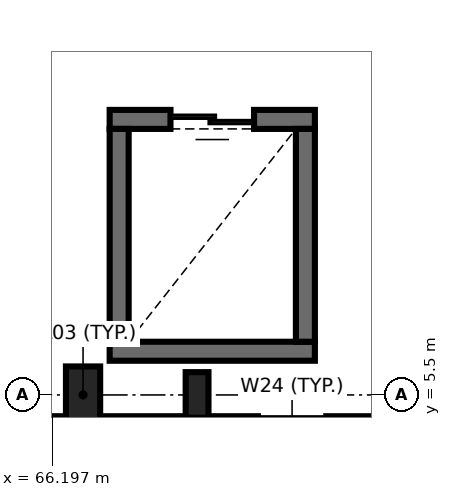
"""IFC4 building model, lengths in metres.
Left out: names, types, materials, properties, quantities, classifications, styles, units other than length and angle.
Written with IfcOpenShell. Run it as: python <this file> out.ifc"""

import sys

from ifc_helpers import new_model, si_unit, direction, frame, frame_2d, origin, origin_2d, place, context, subcontext, project, spatial, rectangle, i_section, extrude, element, fill, save


model = new_model("IFC4")
c1 = context("Model", 3, precision=1e-05, world=origin(), true_north=direction((0.0, 1.0)))
c2 = subcontext(c1, "Body", "Model", "MODEL_VIEW")
j1 = project(units=[si_unit("LENGTHUNIT", "METRE"), si_unit("PLANEANGLEUNIT", "RADIAN")], contexts=[c1])
p1 = place(None, origin())
s1 = spatial("IfcSite", under=j1, at=p1, CompositionType="ELEMENT")
p2 = place(p1, origin())
s2 = spatial("IfcBuilding", under=s1, at=p2, CompositionType="ELEMENT")
p3 = place(p2, origin())
s3 = spatial("IfcBuildingStorey", under=s2, at=p3, CompositionType="ELEMENT", Elevation=0.0)
p4 = place(p3, frame((66.6, 5.5, 0.0), z_axis=(0.0, 0.0, 1.0), x_axis=(1.0, 0.0, 0.0)))
e1 = element("IfcColumn", 1, at=p4, inside=s3, PredefinedType="PILASTER", context=c2, shape_type="SweptSolid", body=[
    extrude(rectangle(XDim=0.45, YDim=0.75, at=origin_2d()), origin(), (0.0, 0.0, 1.0), 4.8),
])
p5 = place(p3, frame((68.1, 5.5, 0.0), z_axis=(0.0, 0.0, 1.0), x_axis=(1.0, 0.0, 0.0)))
e2 = element("IfcColumn", 2, at=p5, inside=s3, PredefinedType="COLUMN", context=c2, shape_type="SweptSolid", body=[
    extrude(i_section(OverallWidth=0.3, OverallDepth=0.6, WebThickness=0.015, FlangeThickness=0.03, FilletRadius=0.027, at=origin_2d()), origin(), (0.0, 0.0, 1.0), 4.8),
])
p6 = place(p3, frame((66.95, 6.075, 0.0), z_axis=(0.0, 0.0, 1.0), x_axis=(1.0, 0.0, 0.0)))
e3 = element("IfcWall", 3, at=p6, inside=s3, PredefinedType="SHEAR", context=c2, shape_type="SweptSolid", body=[
    extrude(rectangle(XDim=2.7, YDim=0.25, at=frame_2d((1.35, 0.0))), origin(), (0.0, 0.0, 1.0), 4.8),
])
p7 = place(p3, frame((69.65, 9.125, 0.0), z_axis=(0.0, 0.0, 1.0), x_axis=(-1.0, 0.0, 0.0)))
e4 = element("IfcWall", 4, at=p7, inside=s3, PredefinedType="SHEAR", context=c2, shape_type="SweptSolid", body=[
    extrude(rectangle(XDim=2.7, YDim=0.25, at=frame_2d((1.35, 0.0))), origin(), (0.0, 0.0, 1.0), 4.8),
])
p8 = place(p7, frame((0.8, 0.0, 0.0)))
e5 = element("IfcOpeningElement", 5, at=p8, cuts=e4, PredefinedType="OPENING", context=c2, shape_type="SweptSolid", body=[
    extrude(rectangle(XDim=1.1, YDim=2.15, at=frame_2d((0.55, 1.075))), frame((0.0, 0.135, 0.0), z_axis=(0.0, -1.0, 0.0), x_axis=(1.0, 0.0, 0.0)), (0.0, 0.0, 1.0), 0.27),
])
for number, where, z_axis, x_axis in (
    (6, (67.075, 9.0, 0.0), (0.0, 0.0, 1.0), (0.0, -1.0, 0.0)),
    (7, (69.525, 6.2, 0.0), (0.0, 0.0, 1.0), (0.0, 1.0, 0.0)),
):
    element("IfcWall", number, at=place(p3, frame(where, z_axis=z_axis, x_axis=x_axis)), inside=s3, PredefinedType="SHEAR", context=c2, shape_type="SweptSolid", body=[
        extrude(rectangle(XDim=2.8, YDim=0.25, at=frame_2d((1.4, 0.0))), origin(), (0.0, 0.0, 1.0), 4.8),
    ])
p9 = place(p3, frame((55.002, 5.06, 0.0), z_axis=(0.0, 0.0, 1.0), x_axis=(1.0, 0.0, 0.0)))
e8 = element("IfcWall", 8, at=p9, inside=s3, PredefinedType="SHEAR", context=c2, shape_type="SweptSolid", body=[
    extrude(rectangle(XDim=49.196, YDim=0.32, at=frame_2d((24.598, 0.0))), origin(), (0.0, 0.0, 1.0), 4.55),
])
p10 = place(p9, frame((19.998, 0.0, 0.0)))
e9 = element("IfcOpeningElement", 9, at=p10, cuts=e8, PredefinedType="OPENING", context=c2, shape_type="SweptSolid", body=[
    extrude(rectangle(XDim=2.0, YDim=2.4, at=frame_2d((1.0, 1.2))), frame((0.0, 0.17, 0.0), z_axis=(0.0, -1.0, 0.0), x_axis=(1.0, 0.0, 0.0)), (0.0, 0.0, 1.0), 0.34),
])
p11 = place(p9, frame((8.283, 0.0, 0.9)))
e10 = element("IfcOpeningElement", 10, at=p11, cuts=e8, PredefinedType="OPENING", context=c2, shape_type="SweptSolid", body=[
    extrude(rectangle(XDim=2.4, YDim=1.8, at=frame_2d((1.2, 0.9))), frame((0.0, 0.17, 0.0), z_axis=(0.0, -1.0, 0.0), x_axis=(1.0, 0.0, 0.0)), (0.0, 0.0, 1.0), 0.34),
])
p12 = place(p9, frame((13.898, 0.0, 0.9)))
e11 = element("IfcOpeningElement", 11, at=p12, cuts=e8, PredefinedType="OPENING", context=c2, shape_type="SweptSolid", body=[
    extrude(rectangle(XDim=0.9, YDim=1.8, at=frame_2d((0.45, 0.9))), frame((0.0, 0.17, 0.0), z_axis=(0.0, -1.0, 0.0), x_axis=(1.0, 0.0, 0.0)), (0.0, 0.0, 1.0), 0.34),
])
p13 = place(p9, frame((25.348, 0.0, 0.9)))
e12 = element("IfcOpeningElement", 12, at=p13, cuts=e8, PredefinedType="OPENING", context=c2, shape_type="SweptSolid", body=[
    extrude(rectangle(XDim=1.5, YDim=2.1, at=frame_2d((0.75, 1.05))), frame((0.0, 0.17, 0.0), z_axis=(0.0, -1.0, 0.0), x_axis=(1.0, 0.0, 0.0)), (0.0, 0.0, 1.0), 0.34),
])
p14 = place(p9, frame((28.373, 0.0, 0.9)))
e13 = element("IfcOpeningElement", 13, at=p14, cuts=e8, PredefinedType="OPENING", context=c2, shape_type="SweptSolid", body=[
    extrude(rectangle(XDim=1.2, YDim=1.8, at=frame_2d((0.6, 0.9))), frame((0.0, 0.17, 0.0), z_axis=(0.0, -1.0, 0.0), x_axis=(1.0, 0.0, 0.0)), (0.0, 0.0, 1.0), 0.34),
])
p15 = place(p9, frame((32.518, 0.0, 0.9)))
e14 = element("IfcOpeningElement", 14, at=p15, cuts=e8, PredefinedType="OPENING", context=c2, shape_type="SweptSolid", body=[
    extrude(rectangle(XDim=1.8, YDim=2.1, at=frame_2d((0.9, 1.05))), frame((0.0, 0.17, 0.0), z_axis=(0.0, -1.0, 0.0), x_axis=(1.0, 0.0, 0.0)), (0.0, 0.0, 1.0), 0.34),
])
p16 = place(p9, frame((37.248, 0.0, 0.9)))
e15 = element("IfcOpeningElement", 15, at=p16, cuts=e8, PredefinedType="OPENING", context=c2, shape_type="SweptSolid", body=[
    extrude(rectangle(XDim=1.2, YDim=1.5, at=frame_2d((0.6, 0.75))), frame((0.0, 0.17, 0.0), z_axis=(0.0, -1.0, 0.0), x_axis=(1.0, 0.0, 0.0)), (0.0, 0.0, 1.0), 0.34),
])
p17 = place(p9, frame((40.268, 0.0, 0.9)))
e16 = element("IfcOpeningElement", 16, at=p17, cuts=e8, PredefinedType="OPENING", context=c2, shape_type="SweptSolid", body=[
    extrude(rectangle(XDim=0.9, YDim=1.8, at=frame_2d((0.45, 0.9))), frame((0.0, 0.17, 0.0), z_axis=(0.0, -1.0, 0.0), x_axis=(1.0, 0.0, 0.0)), (0.0, 0.0, 1.0), 0.34),
])
p18 = place(p9, frame((44.123, 0.0, 0.9)))
e17 = element("IfcOpeningElement", 17, at=p18, cuts=e8, PredefinedType="OPENING", context=c2, shape_type="SweptSolid", body=[
    extrude(rectangle(XDim=1.2, YDim=2.4, at=frame_2d((0.6, 1.2))), frame((0.0, 0.17, 0.0), z_axis=(0.0, -1.0, 0.0), x_axis=(1.0, 0.0, 0.0)), (0.0, 0.0, 1.0), 0.34),
])
p19 = place(p8, origin())
e18 = element("IfcDoor", 18, at=p19, inside=s3, OperationType="DOUBLE_DOOR_SLIDING", PredefinedType="DOOR", context=c2, shape_type="SweptSolid", body=[
    extrude(rectangle(XDim=1.1, YDim=2.15, at=frame_2d((0.55, 1.075))), frame((0.0, 0.025, 0.0), z_axis=(0.0, -1.0, 0.0), x_axis=(1.0, 0.0, 0.0)), (0.0, 0.0, 1.0), 0.05),
])
fill(e5, e18)
save(model, sys.argv[1])
